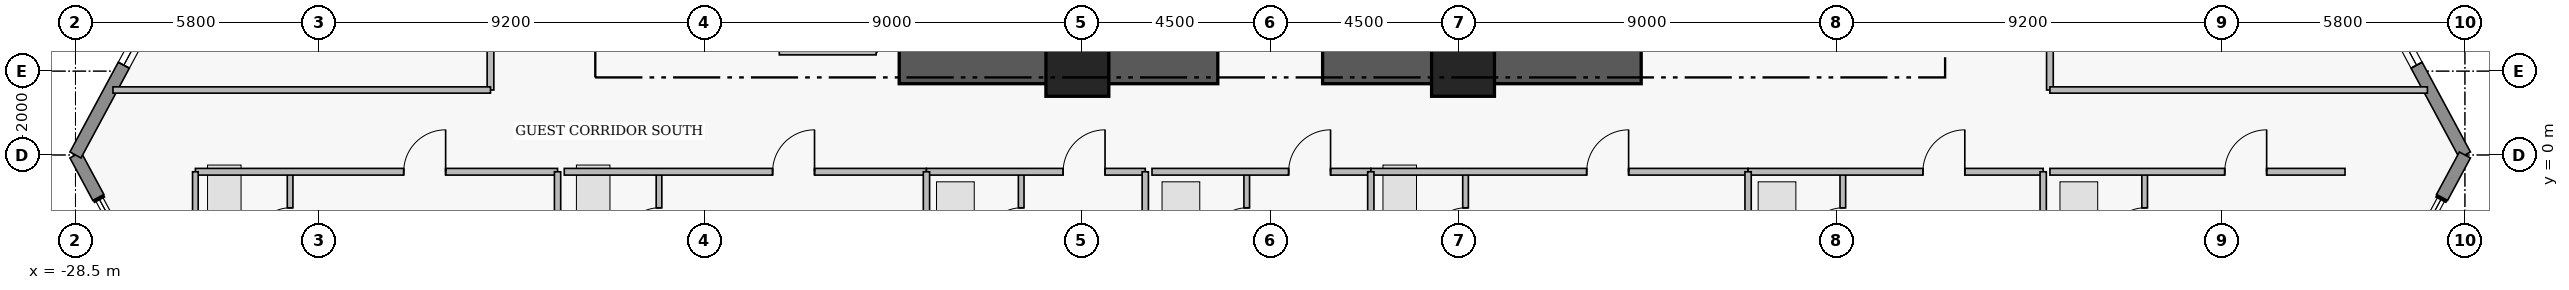
"""IFC4 building model, lengths in metres.
Left out: names, types, materials, properties, quantities, classifications, styles, units other than length and angle.
Written with IfcOpenShell. Run it as: python <this file> out.ifc"""

import sys

from ifc_helpers import new_model, si_unit, direction, frame, frame_2d, origin, origin_2d, place, context, subcontext, project, spatial, rectangle, extrude, element, fill, save


model = new_model("IFC4")
c1 = context("Model", 3, precision=1e-05, world=origin(), true_north=direction((0.0, 1.0)))
c2 = subcontext(c1, "Body", "Model", "MODEL_VIEW")
j1 = project(units=[si_unit("LENGTHUNIT", "METRE"), si_unit("PLANEANGLEUNIT", "RADIAN")], contexts=[c1])
p1 = place(None, origin())
s1 = spatial("IfcSite", under=j1, at=p1, CompositionType="ELEMENT")
p2 = place(p1, origin())
s2 = spatial("IfcBuilding", under=s1, at=p2, CompositionType="ELEMENT")
p3 = place(p2, frame((0.0, 0.0, 38.55)))
s3 = spatial("IfcBuildingStorey", under=s2, at=p3, CompositionType="ELEMENT", Elevation=38.55)
for number, where, z_axis, x_axis in (
    (1, (-8.85, 2.15, 0.0), (0.0, 0.0, 1.0), (1.0, 0.0, 0.0)),
    (2, (1.25, 2.15, 0.0), (0.0, 0.0, 1.0), (1.0, 0.0, 0.0)),
):
    element("IfcWall", number, at=place(p3, frame(where, z_axis=z_axis, x_axis=x_axis)), inside=s3, PredefinedType="SHEAR", context=c2, shape_type="SweptSolid", body=[
        extrude(rectangle(XDim=7.6, YDim=0.9, at=frame_2d((3.8, 0.0))), origin(), (0.0, 0.0, 1.0), 3.43),
    ])
for number, where, z_axis, x_axis in (
    (3, (-4.6, 2.15, 0.0), (0.0, 0.0, 1.0), (1.0, 0.0, 0.0)),
    (4, (4.6, 2.15, 0.0), (0.0, 0.0, 1.0), (1.0, 0.0, 0.0)),
):
    element("IfcColumn", number, at=place(p3, frame(where, z_axis=z_axis, x_axis=x_axis)), inside=s3, PredefinedType="COLUMN", context=c2, shape_type="SweptSolid", body=[
        extrude(rectangle(XDim=1.5, YDim=1.5, at=origin_2d()), origin(), (0.0, 0.0, 1.0), 3.65),
    ])
p4 = place(p3, frame((-27.955, -1.012, 0.0), z_axis=(0.0, 0.0, 1.0), x_axis=(-0.474099823035, 0.880471099922, 0.0)))
e5 = element("IfcWall", 5, at=p4, inside=s3, PredefinedType="STANDARD", context=c2, shape_type="SweptSolid", body=[
    extrude(rectangle(XDim=1.15, YDim=0.3, at=frame_2d((0.575, 0.0))), origin(), (0.0, 0.0, 1.0), 3.43),
])
p5 = place(p3, frame((-28.5, 0.0, 0.0), z_axis=(0.0, 0.0, 1.0), x_axis=(0.474109683532, 0.880465790352, 0.0)))
e6 = element("IfcWall", 6, at=p5, inside=s3, PredefinedType="STANDARD", context=c2, shape_type="SweptSolid", body=[
    extrude(rectangle(XDim=5.906, YDim=0.3, at=frame_2d((2.953, 0.0))), origin(), (0.0, 0.0, 1.0), 3.43),
])
p6 = place(p5, frame((2.432, 0.0, 0.95)))
e7 = element("IfcOpeningElement", 7, at=p6, cuts=e6, PredefinedType="OPENING", context=c2, shape_type="SweptSolid", body=[
    extrude(rectangle(XDim=1.15, YDim=1.55, at=frame_2d((0.575, 0.775))), frame((0.0, 0.16, 0.0), z_axis=(0.0, -1.0, 0.0), x_axis=(1.0, 0.0, 0.0)), (0.0, 0.0, 1.0), 0.32),
])
p7 = place(p3, frame((25.7, 5.2, 0.0), z_axis=(0.0, 0.0, 1.0), x_axis=(0.474109683532, -0.880465790352, 0.0)))
e8 = element("IfcWall", 8, at=p7, inside=s3, PredefinedType="STANDARD", context=c2, shape_type="SweptSolid", body=[
    extrude(rectangle(XDim=5.906, YDim=0.3, at=frame_2d((2.953, 0.0))), origin(), (0.0, 0.0, 1.0), 3.43),
])
p8 = place(p7, frame((2.324, 0.0, 0.95)))
e9 = element("IfcOpeningElement", 9, at=p8, cuts=e8, PredefinedType="OPENING", context=c2, shape_type="SweptSolid", body=[
    extrude(rectangle(XDim=1.15, YDim=1.55, at=frame_2d((0.575, 0.775))), frame((0.0, 0.16, 0.0), z_axis=(0.0, -1.0, 0.0), x_axis=(1.0, 0.0, 0.0)), (0.0, 0.0, 1.0), 0.32),
])
p9 = place(p3, frame((28.5, 0.0, 0.0), z_axis=(0.0, 0.0, 1.0), x_axis=(-0.474099823035, -0.880471099922, 0.0)))
e10 = element("IfcWall", 10, at=p9, inside=s3, PredefinedType="STANDARD", context=c2, shape_type="SweptSolid", body=[
    extrude(rectangle(XDim=1.15, YDim=0.3, at=frame_2d((0.575, 0.0))), origin(), (0.0, 0.0, 1.0), 3.43),
])
p10 = place(p3, frame((-23.38, -2.76, 0.0), z_axis=(0.0, 0.0, 1.0), x_axis=(0.0, 1.0, 0.0)))
e11 = element("IfcWall", 11, at=p10, inside=s3, PredefinedType="PLUMBINGWALL", context=c2, shape_type="SweptSolid", body=[
    extrude(rectangle(XDim=2.36, YDim=0.135, at=frame_2d((1.18, 0.0))), origin(), (0.0, 0.0, 1.0), 3.43),
])
p11 = place(p10, frame((0.65, 0.0, 0.0)))
e12 = element("IfcOpeningElement", 12, at=p11, cuts=e11, PredefinedType="OPENING", context=c2, shape_type="SweptSolid", body=[
    extrude(rectangle(XDim=0.85, YDim=2.1, at=frame_2d((0.425, 1.05))), frame((0.0, 0.077, 0.0), z_axis=(0.0, -1.0, 0.0), x_axis=(1.0, 0.0, 0.0)), (0.0, 0.0, 1.0), 0.155),
])
p12 = place(p3, frame((-25.64, -0.4, 0.0), z_axis=(0.0, 0.0, 1.0), x_axis=(1.0, 0.0, 0.0)))
e13 = element("IfcWall", 13, at=p12, inside=s3, PredefinedType="PARTITIONING", context=c2, shape_type="SweptSolid", body=[
    extrude(rectangle(XDim=8.64, YDim=0.16, at=frame_2d((4.32, 0.0))), origin(), (0.0, 0.0, 1.0), 3.43),
])
p13 = place(p12, frame((4.97, 0.0, 0.0)))
e14 = element("IfcOpeningElement", 14, at=p13, cuts=e13, PredefinedType="OPENING", context=c2, shape_type="SweptSolid", body=[
    extrude(rectangle(XDim=1.0, YDim=2.15, at=frame_2d((0.5, 1.075))), frame((0.0, 0.09, 0.0), z_axis=(0.0, -1.0, 0.0), x_axis=(1.0, 0.0, 0.0)), (0.0, 0.0, 1.0), 0.18),
])
p14 = place(p3, frame((-14.58, -2.76, 0.0), z_axis=(0.0, 0.0, 1.0), x_axis=(0.0, 1.0, 0.0)))
e15 = element("IfcWall", 15, at=p14, inside=s3, PredefinedType="PLUMBINGWALL", context=c2, shape_type="SweptSolid", body=[
    extrude(rectangle(XDim=2.36, YDim=0.135, at=frame_2d((1.18, 0.0))), origin(), (0.0, 0.0, 1.0), 3.43),
])
p15 = place(p14, frame((0.65, 0.0, 0.0)))
e16 = element("IfcOpeningElement", 16, at=p15, cuts=e15, PredefinedType="OPENING", context=c2, shape_type="SweptSolid", body=[
    extrude(rectangle(XDim=0.85, YDim=2.1, at=frame_2d((0.425, 1.05))), frame((0.0, 0.077, 0.0), z_axis=(0.0, -1.0, 0.0), x_axis=(1.0, 0.0, 0.0)), (0.0, 0.0, 1.0), 0.155),
])
p16 = place(p3, frame((-16.84, -0.4, 0.0), z_axis=(0.0, 0.0, 1.0), x_axis=(1.0, 0.0, 0.0)))
e17 = element("IfcWall", 17, at=p16, inside=s3, PredefinedType="PARTITIONING", context=c2, shape_type="SweptSolid", body=[
    extrude(rectangle(XDim=8.64, YDim=0.16, at=frame_2d((4.32, 0.0))), origin(), (0.0, 0.0, 1.0), 3.43),
])
p17 = place(p16, frame((4.97, 0.0, 0.0)))
e18 = element("IfcOpeningElement", 18, at=p17, cuts=e17, PredefinedType="OPENING", context=c2, shape_type="SweptSolid", body=[
    extrude(rectangle(XDim=1.0, YDim=2.15, at=frame_2d((0.5, 1.075))), frame((0.0, 0.09, 0.0), z_axis=(0.0, -1.0, 0.0), x_axis=(1.0, 0.0, 0.0)), (0.0, 0.0, 1.0), 0.18),
])
p18 = place(p3, frame((-5.94, -2.76, 0.0), z_axis=(0.0, 0.0, 1.0), x_axis=(0.0, 1.0, 0.0)))
e19 = element("IfcWall", 19, at=p18, inside=s3, PredefinedType="PLUMBINGWALL", context=c2, shape_type="SweptSolid", body=[
    extrude(rectangle(XDim=2.36, YDim=0.135, at=frame_2d((1.18, 0.0))), origin(), (0.0, 0.0, 1.0), 3.43),
])
p19 = place(p18, frame((0.65, 0.0, 0.0)))
e20 = element("IfcOpeningElement", 20, at=p19, cuts=e19, PredefinedType="OPENING", context=c2, shape_type="SweptSolid", body=[
    extrude(rectangle(XDim=0.85, YDim=2.1, at=frame_2d((0.425, 1.05))), frame((0.0, 0.077, 0.0), z_axis=(0.0, -1.0, 0.0), x_axis=(1.0, 0.0, 0.0)), (0.0, 0.0, 1.0), 0.155),
])
p20 = place(p3, frame((-8.2, -0.4, 0.0), z_axis=(0.0, 0.0, 1.0), x_axis=(1.0, 0.0, 0.0)))
e21 = element("IfcWall", 21, at=p20, inside=s3, PredefinedType="PARTITIONING", context=c2, shape_type="SweptSolid", body=[
    extrude(rectangle(XDim=5.22, YDim=0.16, at=frame_2d((2.61, 0.0))), origin(), (0.0, 0.0, 1.0), 3.43),
])
p21 = place(p20, frame((3.26, 0.0, 0.0)))
e22 = element("IfcOpeningElement", 22, at=p21, cuts=e21, PredefinedType="OPENING", context=c2, shape_type="SweptSolid", body=[
    extrude(rectangle(XDim=1.0, YDim=2.15, at=frame_2d((0.5, 1.075))), frame((0.0, 0.09, 0.0), z_axis=(0.0, -1.0, 0.0), x_axis=(1.0, 0.0, 0.0)), (0.0, 0.0, 1.0), 0.18),
])
p22 = place(p3, frame((-0.56, -2.76, 0.0), z_axis=(0.0, 0.0, 1.0), x_axis=(0.0, 1.0, 0.0)))
e23 = element("IfcWall", 23, at=p22, inside=s3, PredefinedType="PLUMBINGWALL", context=c2, shape_type="SweptSolid", body=[
    extrude(rectangle(XDim=2.36, YDim=0.135, at=frame_2d((1.18, 0.0))), origin(), (0.0, 0.0, 1.0), 3.43),
])
p23 = place(p22, frame((0.65, 0.0, 0.0)))
e24 = element("IfcOpeningElement", 24, at=p23, cuts=e23, PredefinedType="OPENING", context=c2, shape_type="SweptSolid", body=[
    extrude(rectangle(XDim=0.85, YDim=2.1, at=frame_2d((0.425, 1.05))), frame((0.0, 0.077, 0.0), z_axis=(0.0, -1.0, 0.0), x_axis=(1.0, 0.0, 0.0)), (0.0, 0.0, 1.0), 0.155),
])
p24 = place(p3, frame((-2.82, -0.4, 0.0), z_axis=(0.0, 0.0, 1.0), x_axis=(1.0, 0.0, 0.0)))
e25 = element("IfcWall", 25, at=p24, inside=s3, PredefinedType="PARTITIONING", context=c2, shape_type="SweptSolid", body=[
    extrude(rectangle(XDim=5.22, YDim=0.16, at=frame_2d((2.61, 0.0))), origin(), (0.0, 0.0, 1.0), 3.43),
])
p25 = place(p24, frame((3.26, 0.0, 0.0)))
e26 = element("IfcOpeningElement", 26, at=p25, cuts=e25, PredefinedType="OPENING", context=c2, shape_type="SweptSolid", body=[
    extrude(rectangle(XDim=1.0, YDim=2.15, at=frame_2d((0.5, 1.075))), frame((0.0, 0.09, 0.0), z_axis=(0.0, -1.0, 0.0), x_axis=(1.0, 0.0, 0.0)), (0.0, 0.0, 1.0), 0.18),
])
p26 = place(p3, frame((4.66, -2.76, 0.0), z_axis=(0.0, 0.0, 1.0), x_axis=(0.0, 1.0, 0.0)))
e27 = element("IfcWall", 27, at=p26, inside=s3, PredefinedType="PLUMBINGWALL", context=c2, shape_type="SweptSolid", body=[
    extrude(rectangle(XDim=2.36, YDim=0.135, at=frame_2d((1.18, 0.0))), origin(), (0.0, 0.0, 1.0), 2.668),
])
p27 = place(p26, frame((0.65, 0.0, 0.0)))
e28 = element("IfcOpeningElement", 28, at=p27, cuts=e27, PredefinedType="OPENING", context=c2, shape_type="SweptSolid", body=[
    extrude(rectangle(XDim=0.85, YDim=2.1, at=frame_2d((0.425, 1.05))), frame((0.0, 0.077, 0.0), z_axis=(0.0, -1.0, 0.0), x_axis=(1.0, 0.0, 0.0)), (0.0, 0.0, 1.0), 0.155),
])
p28 = place(p3, frame((2.4, -0.4, 0.0), z_axis=(0.0, 0.0, 1.0), x_axis=(1.0, 0.0, 0.0)))
e29 = element("IfcWall", 29, at=p28, inside=s3, PredefinedType="PARTITIONING", context=c2, shape_type="SweptSolid", body=[
    extrude(rectangle(XDim=9.0, YDim=0.16, at=frame_2d((4.5, 0.0))), origin(), (0.0, 0.0, 1.0), 3.43),
])
p29 = place(p28, frame((5.15, 0.0, 0.0)))
e30 = element("IfcOpeningElement", 30, at=p29, cuts=e29, PredefinedType="OPENING", context=c2, shape_type="SweptSolid", body=[
    extrude(rectangle(XDim=1.0, YDim=2.15, at=frame_2d((0.5, 1.075))), frame((0.0, 0.09, 0.0), z_axis=(0.0, -1.0, 0.0), x_axis=(1.0, 0.0, 0.0)), (0.0, 0.0, 1.0), 0.18),
])
p30 = place(p3, frame((13.66, -2.76, 0.0), z_axis=(0.0, 0.0, 1.0), x_axis=(0.0, 1.0, 0.0)))
e31 = element("IfcWall", 31, at=p30, inside=s3, PredefinedType="PLUMBINGWALL", context=c2, shape_type="SweptSolid", body=[
    extrude(rectangle(XDim=2.36, YDim=0.135, at=frame_2d((1.18, 0.0))), origin(), (0.0, 0.0, 1.0), 2.668),
])
p31 = place(p30, frame((0.65, 0.0, 0.0)))
e32 = element("IfcOpeningElement", 32, at=p31, cuts=e31, PredefinedType="OPENING", context=c2, shape_type="SweptSolid", body=[
    extrude(rectangle(XDim=0.85, YDim=2.1, at=frame_2d((0.425, 1.05))), frame((0.0, 0.077, 0.0), z_axis=(0.0, -1.0, 0.0), x_axis=(1.0, 0.0, 0.0)), (0.0, 0.0, 1.0), 0.155),
])
p32 = place(p3, frame((11.4, -0.4, 0.0), z_axis=(0.0, 0.0, 1.0), x_axis=(1.0, 0.0, 0.0)))
e33 = element("IfcWall", 33, at=p32, inside=s3, PredefinedType="PARTITIONING", context=c2, shape_type="SweptSolid", body=[
    extrude(rectangle(XDim=7.04, YDim=0.16, at=frame_2d((3.52, 0.0))), origin(), (0.0, 0.0, 1.0), 3.43),
])
p33 = place(p32, frame((4.17, 0.0, 0.0)))
e34 = element("IfcOpeningElement", 34, at=p33, cuts=e33, PredefinedType="OPENING", context=c2, shape_type="SweptSolid", body=[
    extrude(rectangle(XDim=1.0, YDim=2.15, at=frame_2d((0.5, 1.075))), frame((0.0, 0.09, 0.0), z_axis=(0.0, -1.0, 0.0), x_axis=(1.0, 0.0, 0.0)), (0.0, 0.0, 1.0), 0.18),
])
p34 = place(p3, frame((20.86, -2.76, 0.0), z_axis=(0.0, 0.0, 1.0), x_axis=(0.0, 1.0, 0.0)))
e35 = element("IfcWall", 35, at=p34, inside=s3, PredefinedType="PLUMBINGWALL", context=c2, shape_type="SweptSolid", body=[
    extrude(rectangle(XDim=2.36, YDim=0.135, at=frame_2d((1.18, 0.0))), origin(), (0.0, 0.0, 1.0), 3.43),
])
p35 = place(p34, frame((0.65, 0.0, 0.0)))
e36 = element("IfcOpeningElement", 36, at=p35, cuts=e35, PredefinedType="OPENING", context=c2, shape_type="SweptSolid", body=[
    extrude(rectangle(XDim=0.85, YDim=2.1, at=frame_2d((0.425, 1.05))), frame((0.0, 0.077, 0.0), z_axis=(0.0, -1.0, 0.0), x_axis=(1.0, 0.0, 0.0)), (0.0, 0.0, 1.0), 0.155),
])
p36 = place(p3, frame((18.6, -0.4, 0.0), z_axis=(0.0, 0.0, 1.0), x_axis=(1.0, 0.0, 0.0)))
e37 = element("IfcWall", 37, at=p36, inside=s3, PredefinedType="PARTITIONING", context=c2, shape_type="SweptSolid", body=[
    extrude(rectangle(XDim=7.04, YDim=0.16, at=frame_2d((3.52, 0.0))), origin(), (0.0, 0.0, 1.0), 3.43),
])
p37 = place(p36, frame((4.17, 0.0, 0.0)))
e38 = element("IfcOpeningElement", 38, at=p37, cuts=e37, PredefinedType="OPENING", context=c2, shape_type="SweptSolid", body=[
    extrude(rectangle(XDim=1.0, YDim=2.15, at=frame_2d((0.5, 1.075))), frame((0.0, 0.09, 0.0), z_axis=(0.0, -1.0, 0.0), x_axis=(1.0, 0.0, 0.0)), (0.0, 0.0, 1.0), 0.18),
])
p38 = place(p3, frame((18.6, 1.55, 0.0), z_axis=(0.0, 0.0, 1.0), x_axis=(0.0, 1.0, 0.0)))
e39 = element("IfcWall", 39, at=p38, inside=s3, PredefinedType="PARTITIONING", context=c2, shape_type="SweptSolid", body=[
    extrude(rectangle(XDim=5.2, YDim=0.16, at=frame_2d((2.6, 0.0))), origin(), (0.0, 0.0, 1.0), 3.43),
])
p39 = place(p38, frame((2.14, 0.0, 0.0)))
e40 = element("IfcOpeningElement", 40, at=p39, cuts=e39, PredefinedType="OPENING", context=c2, shape_type="SweptSolid", body=[
    extrude(rectangle(XDim=0.92, YDim=2.12, at=frame_2d((0.46, 1.06))), frame((0.0, 0.09, 0.0), z_axis=(0.0, -1.0, 0.0), x_axis=(1.0, 0.0, 0.0)), (0.0, 0.0, 1.0), 0.18),
])
p40 = place(p3, frame((-18.6, 1.55, 0.0), z_axis=(0.0, 0.0, 1.0), x_axis=(0.0, 1.0, 0.0)))
e41 = element("IfcWall", 41, at=p40, inside=s3, PredefinedType="PARTITIONING", context=c2, shape_type="SweptSolid", body=[
    extrude(rectangle(XDim=5.2, YDim=0.16, at=frame_2d((2.6, 0.0))), origin(), (0.0, 0.0, 1.0), 3.43),
])
p41 = place(p40, frame((2.125, 0.0, 0.0)))
e42 = element("IfcOpeningElement", 42, at=p41, cuts=e41, PredefinedType="OPENING", context=c2, shape_type="SweptSolid", body=[
    extrude(rectangle(XDim=0.95, YDim=2.15, at=frame_2d((0.475, 1.075))), frame((0.0, 0.09, 0.0), z_axis=(0.0, -1.0, 0.0), x_axis=(1.0, 0.0, 0.0)), (0.0, 0.0, 1.0), 0.18),
])
p42 = place(p3, frame((-11.71, 2.47, 0.0), z_axis=(0.0, 0.0, 1.0), x_axis=(1.0, 0.0, 0.0)))
e43 = element("IfcWall", 43, at=p42, inside=s3, PredefinedType="PARTITIONING", context=c2, shape_type="SweptSolid", body=[
    extrude(rectangle(XDim=2.31, YDim=0.165, at=frame_2d((1.155, 0.0))), origin(), (0.0, 0.0, 1.0), 2.03),
])
p43 = place(p3, frame((-25.64, -2.76, 0.0), z_axis=(0.0, 0.0, 1.0), x_axis=(0.0, 1.0, 0.0)))
e44 = element("IfcWall", 44, at=p43, inside=s3, PredefinedType="PLUMBINGWALL", context=c2, shape_type="SweptSolid", body=[
    extrude(rectangle(XDim=2.36, YDim=0.135, at=frame_2d((1.18, 0.0))), origin(), (0.0, 0.0, 1.0), 3.43),
])
for number, where, z_axis, x_axis in (
    (45, (-17.0, -23.02, 0.0), (0.0, 0.0, 1.0), (0.0, 1.0, 0.0)),
    (46, (-8.2, -23.02, 0.0), (0.0, 0.0, 1.0), (0.0, 1.0, 0.0)),
    (47, (-2.98, -23.02, 0.0), (0.0, 0.0, 1.0), (0.0, 1.0, 0.0)),
    (48, (2.4, -23.02, 0.0), (0.0, 0.0, 1.0), (0.0, 1.0, 0.0)),
    (49, (11.4, -23.02, 0.0), (0.0, 0.0, 1.0), (0.0, 1.0, 0.0)),
    (50, (18.44, -23.02, 0.0), (0.0, 0.0, 1.0), (0.0, 1.0, 0.0)),
):
    element("IfcWall", number, at=place(p3, frame(where, z_axis=z_axis, x_axis=x_axis)), inside=s3, PredefinedType="PARTITIONING", context=c2, shape_type="SweptSolid", body=[
        extrude(rectangle(XDim=22.62, YDim=0.15, at=frame_2d((11.31, 0.0))), origin(), (0.0, 0.0, 1.0), 3.43),
    ])
for number, where, z_axis, x_axis in (
    (51, (18.6, 1.55, 0.0), (0.0, 0.0, 1.0), (1.0, 0.0, 0.0)),
    (52, (-27.605, 1.55, 0.0), (0.0, 0.0, 1.0), (1.0, 0.0, 0.0)),
):
    element("IfcWall", number, at=place(p3, frame(where, z_axis=z_axis, x_axis=x_axis)), inside=s3, PredefinedType="PARTITIONING", context=c2, shape_type="SweptSolid", body=[
        extrude(rectangle(XDim=9.005, YDim=0.15, at=frame_2d((4.503, 0.0))), origin(), (0.0, 0.0, 1.0), 3.43),
    ])
p44 = place(p6, origin())
e53 = element("IfcWindow", 53, at=p44, inside=s3, PartitioningType="SINGLE_PANEL", PredefinedType="WINDOW", context=c2, shape_type="SweptSolid", body=[
    extrude(rectangle(XDim=1.15, YDim=1.55, at=frame_2d((0.575, 0.775))), frame((0.0, 0.03, 0.0), z_axis=(0.0, -1.0, 0.0), x_axis=(1.0, 0.0, 0.0)), (0.0, 0.0, 1.0), 0.06),
])
fill(e7, e53)
p45 = place(p8, origin())
e54 = element("IfcWindow", 54, at=p45, inside=s3, PartitioningType="SINGLE_PANEL", PredefinedType="WINDOW", context=c2, shape_type="SweptSolid", body=[
    extrude(rectangle(XDim=1.15, YDim=1.55, at=frame_2d((0.575, 0.775))), frame((0.0, 0.03, 0.0), z_axis=(0.0, -1.0, 0.0), x_axis=(1.0, 0.0, 0.0)), (0.0, 0.0, 1.0), 0.06),
])
fill(e9, e54)
p46 = place(p11, origin())
e55 = element("IfcDoor", 55, at=p46, inside=s3, OperationType="SINGLE_SWING_LEFT", PredefinedType="DOOR", context=c2, shape_type="SweptSolid", body=[
    extrude(rectangle(XDim=0.85, YDim=2.1, at=frame_2d((0.425, 1.05))), frame((0.0, 0.025, 0.0), z_axis=(0.0, -1.0, 0.0), x_axis=(1.0, 0.0, 0.0)), (0.0, 0.0, 1.0), 0.05),
])
fill(e12, e55)
p47 = place(p13, origin())
e56 = element("IfcDoor", 56, at=p47, inside=s3, OperationType="SINGLE_SWING_RIGHT", PredefinedType="DOOR", context=c2, shape_type="SweptSolid", body=[
    extrude(rectangle(XDim=1.0, YDim=2.15, at=frame_2d((0.5, 1.075))), frame((0.0, 0.025, 0.0), z_axis=(0.0, -1.0, 0.0), x_axis=(1.0, 0.0, 0.0)), (0.0, 0.0, 1.0), 0.05),
])
fill(e14, e56)
p48 = place(p15, origin())
e57 = element("IfcDoor", 57, at=p48, inside=s3, OperationType="SINGLE_SWING_LEFT", PredefinedType="DOOR", context=c2, shape_type="SweptSolid", body=[
    extrude(rectangle(XDim=0.85, YDim=2.1, at=frame_2d((0.425, 1.05))), frame((0.0, 0.025, 0.0), z_axis=(0.0, -1.0, 0.0), x_axis=(1.0, 0.0, 0.0)), (0.0, 0.0, 1.0), 0.05),
])
fill(e16, e57)
p49 = place(p17, origin())
e58 = element("IfcDoor", 58, at=p49, inside=s3, OperationType="SINGLE_SWING_RIGHT", PredefinedType="DOOR", context=c2, shape_type="SweptSolid", body=[
    extrude(rectangle(XDim=1.0, YDim=2.15, at=frame_2d((0.5, 1.075))), frame((0.0, 0.025, 0.0), z_axis=(0.0, -1.0, 0.0), x_axis=(1.0, 0.0, 0.0)), (0.0, 0.0, 1.0), 0.05),
])
fill(e18, e58)
p50 = place(p19, origin())
e59 = element("IfcDoor", 59, at=p50, inside=s3, OperationType="SINGLE_SWING_LEFT", PredefinedType="DOOR", context=c2, shape_type="SweptSolid", body=[
    extrude(rectangle(XDim=0.85, YDim=2.1, at=frame_2d((0.425, 1.05))), frame((0.0, 0.025, 0.0), z_axis=(0.0, -1.0, 0.0), x_axis=(1.0, 0.0, 0.0)), (0.0, 0.0, 1.0), 0.05),
])
fill(e20, e59)
p51 = place(p21, origin())
e60 = element("IfcDoor", 60, at=p51, inside=s3, OperationType="SINGLE_SWING_RIGHT", PredefinedType="DOOR", context=c2, shape_type="SweptSolid", body=[
    extrude(rectangle(XDim=1.0, YDim=2.15, at=frame_2d((0.5, 1.075))), frame((0.0, 0.025, 0.0), z_axis=(0.0, -1.0, 0.0), x_axis=(1.0, 0.0, 0.0)), (0.0, 0.0, 1.0), 0.05),
])
fill(e22, e60)
p52 = place(p23, origin())
e61 = element("IfcDoor", 61, at=p52, inside=s3, OperationType="SINGLE_SWING_LEFT", PredefinedType="DOOR", context=c2, shape_type="SweptSolid", body=[
    extrude(rectangle(XDim=0.85, YDim=2.1, at=frame_2d((0.425, 1.05))), frame((0.0, 0.025, 0.0), z_axis=(0.0, -1.0, 0.0), x_axis=(1.0, 0.0, 0.0)), (0.0, 0.0, 1.0), 0.05),
])
fill(e24, e61)
p53 = place(p25, origin())
e62 = element("IfcDoor", 62, at=p53, inside=s3, OperationType="SINGLE_SWING_RIGHT", PredefinedType="DOOR", context=c2, shape_type="SweptSolid", body=[
    extrude(rectangle(XDim=1.0, YDim=2.15, at=frame_2d((0.5, 1.075))), frame((0.0, 0.025, 0.0), z_axis=(0.0, -1.0, 0.0), x_axis=(1.0, 0.0, 0.0)), (0.0, 0.0, 1.0), 0.05),
])
fill(e26, e62)
p54 = place(p27, origin())
e63 = element("IfcDoor", 63, at=p54, inside=s3, OperationType="SINGLE_SWING_LEFT", PredefinedType="DOOR", context=c2, shape_type="SweptSolid", body=[
    extrude(rectangle(XDim=0.85, YDim=2.1, at=frame_2d((0.425, 1.05))), frame((0.0, 0.025, 0.0), z_axis=(0.0, -1.0, 0.0), x_axis=(1.0, 0.0, 0.0)), (0.0, 0.0, 1.0), 0.05),
])
fill(e28, e63)
p55 = place(p29, origin())
e64 = element("IfcDoor", 64, at=p55, inside=s3, OperationType="SINGLE_SWING_RIGHT", PredefinedType="DOOR", context=c2, shape_type="SweptSolid", body=[
    extrude(rectangle(XDim=1.0, YDim=2.15, at=frame_2d((0.5, 1.075))), frame((0.0, 0.025, 0.0), z_axis=(0.0, -1.0, 0.0), x_axis=(1.0, 0.0, 0.0)), (0.0, 0.0, 1.0), 0.05),
])
fill(e30, e64)
p56 = place(p31, origin())
e65 = element("IfcDoor", 65, at=p56, inside=s3, OperationType="SINGLE_SWING_LEFT", PredefinedType="DOOR", context=c2, shape_type="SweptSolid", body=[
    extrude(rectangle(XDim=0.85, YDim=2.1, at=frame_2d((0.425, 1.05))), frame((0.0, 0.025, 0.0), z_axis=(0.0, -1.0, 0.0), x_axis=(1.0, 0.0, 0.0)), (0.0, 0.0, 1.0), 0.05),
])
fill(e32, e65)
p57 = place(p33, origin())
e66 = element("IfcDoor", 66, at=p57, inside=s3, OperationType="SINGLE_SWING_RIGHT", PredefinedType="DOOR", context=c2, shape_type="SweptSolid", body=[
    extrude(rectangle(XDim=1.0, YDim=2.15, at=frame_2d((0.5, 1.075))), frame((0.0, 0.025, 0.0), z_axis=(0.0, -1.0, 0.0), x_axis=(1.0, 0.0, 0.0)), (0.0, 0.0, 1.0), 0.05),
])
fill(e34, e66)
p58 = place(p35, origin())
e67 = element("IfcDoor", 67, at=p58, inside=s3, OperationType="SINGLE_SWING_LEFT", PredefinedType="DOOR", context=c2, shape_type="SweptSolid", body=[
    extrude(rectangle(XDim=0.85, YDim=2.1, at=frame_2d((0.425, 1.05))), frame((0.0, 0.025, 0.0), z_axis=(0.0, -1.0, 0.0), x_axis=(1.0, 0.0, 0.0)), (0.0, 0.0, 1.0), 0.05),
])
fill(e36, e67)
p59 = place(p37, origin())
e68 = element("IfcDoor", 68, at=p59, inside=s3, OperationType="SINGLE_SWING_RIGHT", PredefinedType="DOOR", context=c2, shape_type="SweptSolid", body=[
    extrude(rectangle(XDim=1.0, YDim=2.15, at=frame_2d((0.5, 1.075))), frame((0.0, 0.025, 0.0), z_axis=(0.0, -1.0, 0.0), x_axis=(1.0, 0.0, 0.0)), (0.0, 0.0, 1.0), 0.05),
])
fill(e38, e68)
save(model, sys.argv[1])
